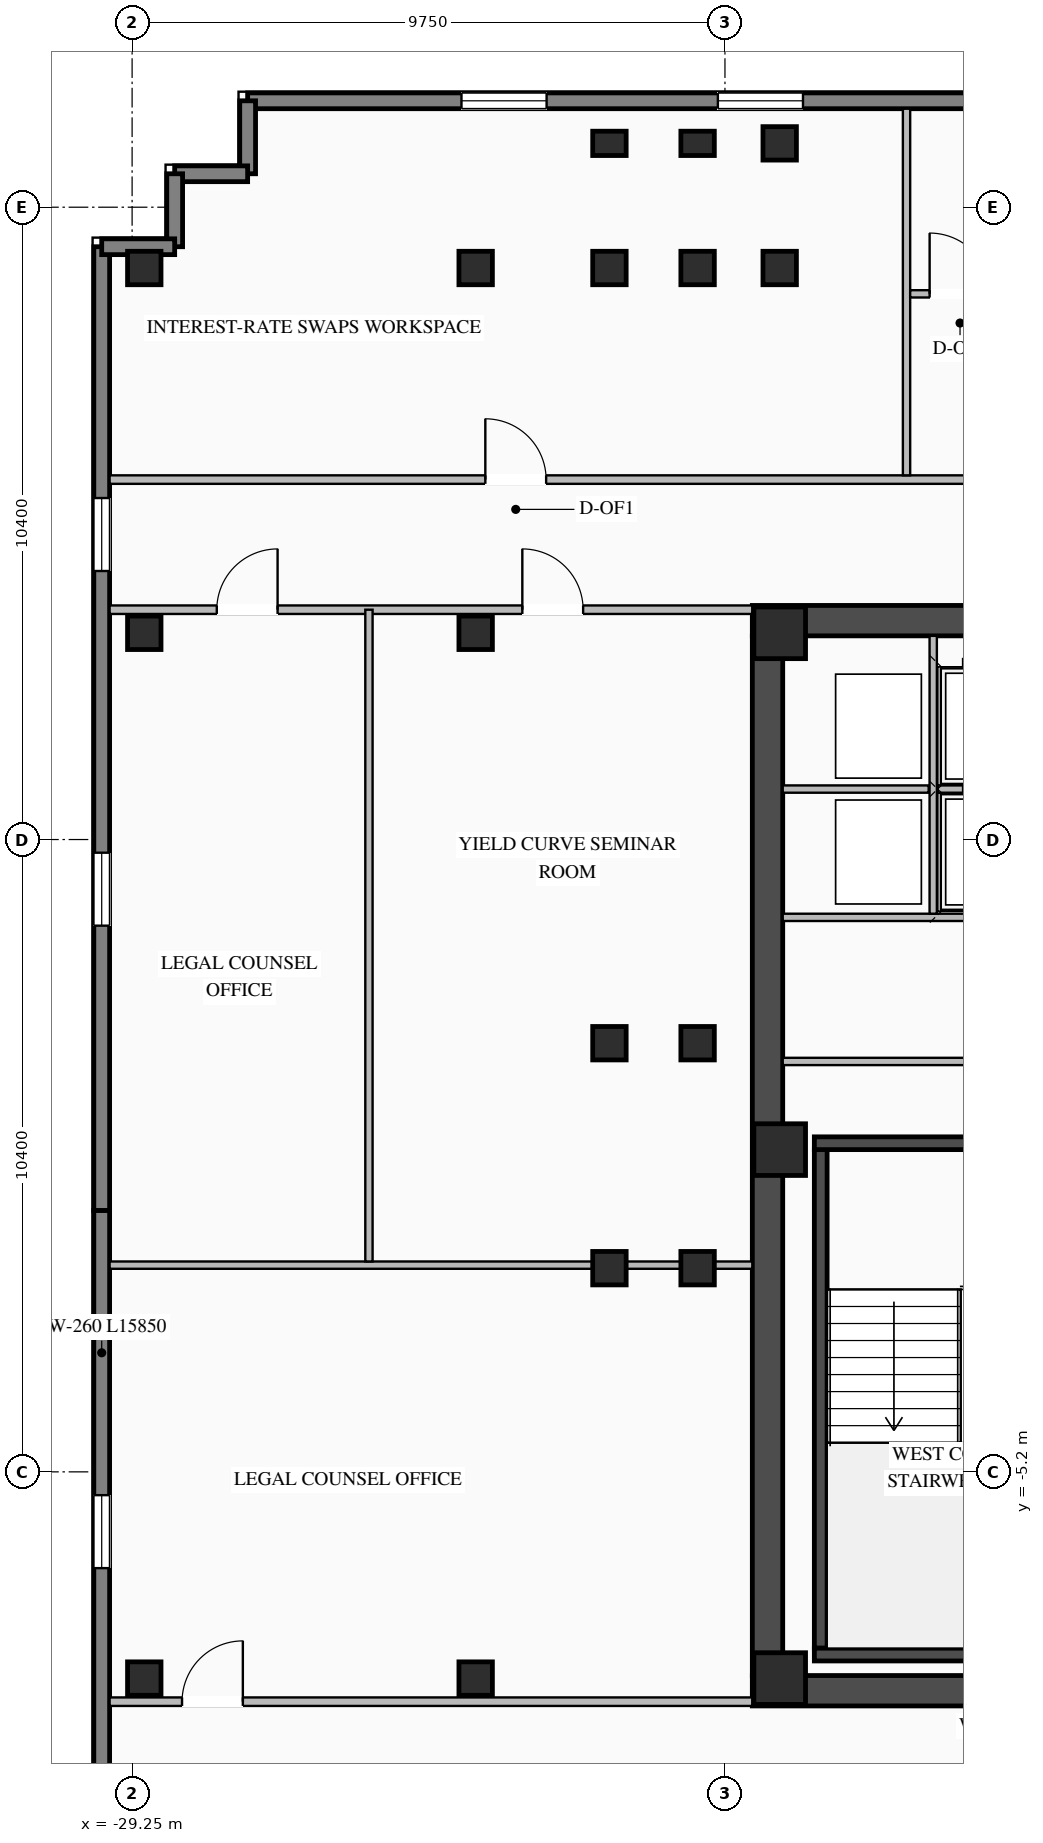
"""IFC4 building model, lengths in metres.
Left out: names, types, materials, properties, quantities, classifications, styles, units other than length and angle.
Written with IfcOpenShell. Run it as: python <this file> out.ifc"""

import sys

from ifc_helpers import new_model, si_unit, direction, frame, frame_2d, origin, origin_2d, place, context, subcontext, project, spatial, rectangle, i_section, extrude, element, fill, save


model = new_model("IFC4")
c1 = context("Model", 3, precision=1e-05, world=origin(), true_north=direction((0.0, 1.0)))
c2 = subcontext(c1, "Body", "Model", "MODEL_VIEW")
j1 = project(units=[si_unit("LENGTHUNIT", "METRE"), si_unit("PLANEANGLEUNIT", "RADIAN")], contexts=[c1])
p1 = place(None, origin())
s1 = spatial("IfcSite", under=j1, at=p1, CompositionType="ELEMENT")
p2 = place(p1, origin())
s2 = spatial("IfcBuilding", under=s1, at=p2, CompositionType="ELEMENT")
p3 = place(p2, frame((0.0, 0.0, 229.2)))
s3 = spatial("IfcBuildingStorey", under=s2, at=p3, CompositionType="ELEMENT", Elevation=229.2)
p4 = place(p3, frame((-19.05, -8.8, 0.0), z_axis=(0.0, 0.0, 1.0), x_axis=(1.0, 0.0, 0.0)))
e1 = element("IfcWall", 1, at=p4, inside=s3, PredefinedType="SHEAR", context=c2, shape_type="SweptSolid", body=[
    extrude(rectangle(XDim=10.25, YDim=0.5, at=frame_2d((5.125, 0.0))), origin(), (0.0, 0.0, 1.0), 3.27),
])
p5 = place(p3, frame((-19.05, 8.8, 0.0), z_axis=(0.0, 0.0, 1.0), x_axis=(1.0, 0.0, 0.0)))
e2 = element("IfcWall", 2, at=p5, inside=s3, PredefinedType="SHEAR", context=c2, shape_type="SweptSolid", body=[
    extrude(rectangle(XDim=10.25, YDim=0.5, at=frame_2d((5.125, 0.0))), origin(), (0.0, 0.0, 1.0), 3.27),
])
p6 = place(p5, frame((5.6, 0.0, 0.0)))
e3 = element("IfcOpeningElement", 3, at=p6, cuts=e2, PredefinedType="OPENING", context=c2, shape_type="SweptSolid", body=[
    extrude(rectangle(XDim=1.4, YDim=2.05, at=frame_2d((0.7, 1.025))), frame((0.0, 0.26, 0.0), z_axis=(0.0, -1.0, 0.0), x_axis=(1.0, 0.0, 0.0)), (0.0, 0.0, 1.0), 0.52),
])
p7 = place(p3, frame((-18.8, -8.55, 0.0), z_axis=(0.0, 0.0, 1.0), x_axis=(0.0, 1.0, 0.0)))
e4 = element("IfcWall", 4, at=p7, inside=s3, PredefinedType="SHEAR", context=c2, shape_type="SweptSolid", body=[
    extrude(rectangle(XDim=17.1, YDim=0.5, at=frame_2d((8.55, 0.0))), origin(), (0.0, 0.0, 1.0), 3.27),
])
p8 = place(p3, frame((-17.925, -8.1, 0.0), z_axis=(0.0, 0.0, 1.0), x_axis=(0.0, 1.0, 0.0)))
e5 = element("IfcWall", 5, at=p8, inside=s3, PredefinedType="SHEAR", context=c2, shape_type="SweptSolid", body=[
    extrude(rectangle(XDim=8.2, YDim=0.21, at=frame_2d((4.1, 0.0))), origin(), (0.0, 0.0, 1.0), 3.27),
])
for number, where, z_axis, x_axis in (
    (6, (-18.03, -8.205, 0.0), (0.0, 0.0, 1.0), (1.0, 0.0, 0.0)),
    (7, (-12.89, 0.205, 0.0), (0.0, 0.0, 1.0), (-1.0, 0.0, 0.0)),
):
    element("IfcWall", number, at=place(p3, frame(where, z_axis=z_axis, x_axis=x_axis)), inside=s3, PredefinedType="SHEAR", context=c2, shape_type="SweptSolid", body=[
        extrude(rectangle(XDim=5.14, YDim=0.21, at=frame_2d((2.57, 0.0))), origin(), (0.0, 0.0, 1.0), 3.27),
    ])
for number, where, z_axis, x_axis in (
    (8, (-18.6, -8.6, 0.0), (0.0, 0.0, 1.0), (1.0, 0.0, 0.0)),
    (9, (-18.6, 0.1, 0.0), (0.0, 0.0, 1.0), (1.0, 0.0, 0.0)),
    (10, (-18.6, 8.6, 0.0), (0.0, 0.0, 1.0), (1.0, 0.0, 0.0)),
):
    element("IfcColumn", number, at=place(p3, frame(where, z_axis=z_axis, x_axis=x_axis)), inside=s3, PredefinedType="COLUMN", context=c2, shape_type="SweptSolid", body=[
        extrude(rectangle(XDim=0.85, YDim=0.85, at=origin_2d()), origin(), (0.0, 0.0, 1.0), 3.45),
    ])
for number, where, z_axis, x_axis in (
    (11, (-21.4, 14.6, 0.0), (0.0, 0.0, 1.0), (1.0, 0.0, 0.0)),
    (12, (-19.95, 14.6, 0.0), (0.0, 0.0, 1.0), (1.0, 0.0, 0.0)),
    (13, (-18.6, 14.6, 0.0), (0.0, 0.0, 1.0), (1.0, 0.0, 0.0)),
    (14, (-21.4, -1.85, 0.0), (0.0, 0.0, 1.0), (1.0, 0.0, 0.0)),
    (15, (-21.4, 1.85, 0.0), (0.0, 0.0, 1.0), (1.0, 0.0, 0.0)),
    (16, (-19.95, -1.85, 0.0), (0.0, 0.0, 1.0), (1.0, 0.0, 0.0)),
    (17, (-19.95, 1.85, 0.0), (0.0, 0.0, 1.0), (1.0, 0.0, 0.0)),
    (18, (-23.6, -8.6, 0.0), (0.0, 0.0, 1.0), (1.0, 0.0, 0.0)),
    (19, (-23.6, 8.6, 0.0), (0.0, 0.0, 1.0), (1.0, 0.0, 0.0)),
    (20, (-23.6, 14.6, 0.0), (0.0, 0.0, 1.0), (1.0, 0.0, 0.0)),
    (21, (-18.6, 16.65, 0.0), (0.0, 0.0, 1.0), (1.0, 0.0, 0.0)),
    (22, (-29.05, -8.6, 0.0), (0.0, 0.0, 1.0), (1.0, 0.0, 0.0)),
    (23, (-29.05, 8.6, 0.0), (0.0, 0.0, 1.0), (1.0, 0.0, 0.0)),
    (24, (-29.05, 14.6, 0.0), (0.0, 0.0, 1.0), (1.0, 0.0, 0.0)),
):
    element("IfcColumn", number, at=place(p3, frame(where, z_axis=z_axis, x_axis=x_axis)), inside=s3, PredefinedType="COLUMN", context=c2, shape_type="SweptSolid", body=[
        extrude(i_section(OverallWidth=0.55, OverallDepth=0.55, WebThickness=0.024, FlangeThickness=0.036, at=origin_2d()), origin(), (0.0, 0.0, 1.0), 3.45),
    ])
for number, where, z_axis, x_axis in (
    (25, (-21.4, 16.65, 0.0), (0.0, 0.0, 1.0), (1.0, 0.0, 0.0)),
    (26, (-19.95, 16.65, 0.0), (0.0, 0.0, 1.0), (1.0, 0.0, 0.0)),
):
    element("IfcColumn", number, at=place(p3, frame(where, z_axis=z_axis, x_axis=x_axis)), inside=s3, PredefinedType="PILASTER", context=c2, shape_type="SweptSolid", body=[
        extrude(rectangle(XDim=0.55, YDim=0.4, at=origin_2d()), origin(), (0.0, 0.0, 1.0), 3.45),
    ])
p9 = place(p3, frame((-27.35, 17.35, 0.0), z_axis=(0.0, 0.0, 1.0), x_axis=(1.0, 0.0, 0.0)))
e27 = element("IfcWall", 27, at=p9, inside=s3, PredefinedType="STANDARD", context=c2, shape_type="SweptSolid", body=[
    extrude(rectangle(XDim=12.65, YDim=0.26, at=frame_2d((6.325, 0.0))), origin(), (0.0, 0.0, 1.0), 3.25),
])
p10 = place(p9, frame((3.517, 0.0, 0.76)))
e28 = element("IfcOpeningElement", 28, at=p10, cuts=e27, PredefinedType="OPENING", context=c2, shape_type="SweptSolid", body=[
    extrude(rectangle(XDim=1.4, YDim=1.95, at=frame_2d((0.7, 0.975))), frame((0.0, 0.14, 0.0), z_axis=(0.0, -1.0, 0.0), x_axis=(1.0, 0.0, 0.0)), (0.0, 0.0, 1.0), 0.28),
])
p11 = place(p9, frame((7.733, 0.0, 0.76)))
e29 = element("IfcOpeningElement", 29, at=p11, cuts=e27, PredefinedType="OPENING", context=c2, shape_type="SweptSolid", body=[
    extrude(rectangle(XDim=1.4, YDim=1.95, at=frame_2d((0.7, 0.975))), frame((0.0, 0.14, 0.0), z_axis=(0.0, -1.0, 0.0), x_axis=(1.0, 0.0, 0.0)), (0.0, 0.0, 1.0), 0.28),
])
p12 = place(p3, frame((-29.75, -16.75, 0.0), z_axis=(0.0, 0.0, 1.0), x_axis=(0.0, 1.0, 0.0)))
e30 = element("IfcWall", 30, at=p12, inside=s3, PredefinedType="STANDARD", context=c2, shape_type="SweptSolid", body=[
    extrude(rectangle(XDim=15.85, YDim=0.26, at=frame_2d((7.925, 0.0))), origin(), (0.0, 0.0, 1.0), 3.25),
])
p13 = place(p12, frame((4.133, 0.0, 0.76)))
e31 = element("IfcOpeningElement", 31, at=p13, cuts=e30, PredefinedType="OPENING", context=c2, shape_type="SweptSolid", body=[
    extrude(rectangle(XDim=1.2, YDim=1.95, at=frame_2d((0.6, 0.975))), frame((0.0, 0.14, 0.0), z_axis=(0.0, -1.0, 0.0), x_axis=(1.0, 0.0, 0.0)), (0.0, 0.0, 1.0), 0.28),
])
p14 = place(p12, frame((9.967, 0.0, 0.76)))
e32 = element("IfcOpeningElement", 32, at=p14, cuts=e30, PredefinedType="OPENING", context=c2, shape_type="SweptSolid", body=[
    extrude(rectangle(XDim=1.2, YDim=1.95, at=frame_2d((0.6, 0.975))), frame((0.0, 0.14, 0.0), z_axis=(0.0, -1.0, 0.0), x_axis=(1.0, 0.0, 0.0)), (0.0, 0.0, 1.0), 0.28),
])
p15 = place(p3, frame((-29.75, -0.9, 0.0), z_axis=(0.0, 0.0, 1.0), x_axis=(0.0, 1.0, 0.0)))
e33 = element("IfcWall", 33, at=p15, inside=s3, PredefinedType="STANDARD", context=c2, shape_type="SweptSolid", body=[
    extrude(rectangle(XDim=15.85, YDim=0.26, at=frame_2d((7.925, 0.0))), origin(), (0.0, 0.0, 1.0), 3.25),
])
p16 = place(p15, frame((4.683, 0.0, 0.76)))
e34 = element("IfcOpeningElement", 34, at=p16, cuts=e33, PredefinedType="OPENING", context=c2, shape_type="SweptSolid", body=[
    extrude(rectangle(XDim=1.2, YDim=1.95, at=frame_2d((0.6, 0.975))), frame((0.0, 0.14, 0.0), z_axis=(0.0, -1.0, 0.0), x_axis=(1.0, 0.0, 0.0)), (0.0, 0.0, 1.0), 0.28),
])
p17 = place(p15, frame((10.517, 0.0, 0.76)))
e35 = element("IfcOpeningElement", 35, at=p17, cuts=e33, PredefinedType="OPENING", context=c2, shape_type="SweptSolid", body=[
    extrude(rectangle(XDim=1.2, YDim=1.95, at=frame_2d((0.6, 0.975))), frame((0.0, 0.14, 0.0), z_axis=(0.0, -1.0, 0.0), x_axis=(1.0, 0.0, 0.0)), (0.0, 0.0, 1.0), 0.28),
])
p18 = place(p3, frame((-27.35, 17.35, 0.0), z_axis=(0.0, 0.0, 1.0), x_axis=(0.0, -1.0, 0.0)))
e36 = element("IfcWall", 36, at=p18, inside=s3, PredefinedType="STANDARD", context=c2, shape_type="SweptSolid", body=[
    extrude(rectangle(XDim=1.2, YDim=0.26, at=frame_2d((0.6, 0.0))), origin(), (0.0, 0.0, 1.0), 2.565),
])
for number, where, z_axis, x_axis in (
    (37, (-27.35, 16.15, 0.0), (0.0, 0.0, 1.0), (-1.0, 0.0, 0.0)),
    (38, (-28.55, 16.15, 0.0), (0.0, 0.0, 1.0), (0.0, -1.0, 0.0)),
    (39, (-28.55, 14.95, 0.0), (0.0, 0.0, 1.0), (-1.0, 0.0, 0.0)),
):
    element("IfcWall", number, at=place(p3, frame(where, z_axis=z_axis, x_axis=x_axis)), inside=s3, PredefinedType="STANDARD", context=c2, shape_type="SweptSolid", body=[
        extrude(rectangle(XDim=1.2, YDim=0.26, at=frame_2d((0.6, 0.0))), origin(), (0.0, 0.0, 1.0), 2.565),
    ])
p19 = place(p3, frame((-18.55, 3.92, 0.0), z_axis=(0.0, 0.0, 1.0), x_axis=(1.0, 0.0, 0.0)))
e40 = element("IfcWall", 40, at=p19, inside=s3, PredefinedType="STANDARD", context=c2, shape_type="SweptSolid", body=[
    extrude(rectangle(XDim=4.65, YDim=0.12, at=frame_2d((2.325, 0.0))), origin(), (0.0, 0.0, 1.0), 3.25),
])
p20 = place(p3, frame((-18.55, 6.03, 0.0), z_axis=(0.0, 0.0, 1.0), x_axis=(1.0, 0.0, 0.0)))
e41 = element("IfcWall", 41, at=p20, inside=s3, PredefinedType="STANDARD", context=c2, shape_type="SweptSolid", body=[
    extrude(rectangle(XDim=2.4, YDim=0.12, at=frame_2d((1.2, 0.0))), origin(), (0.0, 0.0, 1.0), 3.25),
])
p21 = place(p3, frame((-16.075, 3.98, 0.0), z_axis=(0.0, 0.0, 1.0), x_axis=(0.0, 1.0, 0.0)))
e42 = element("IfcWall", 42, at=p21, inside=s3, PredefinedType="STANDARD", context=c2, shape_type="SweptSolid", body=[
    extrude(rectangle(XDim=4.57, YDim=0.12, at=frame_2d((2.285, 0.0))), origin(), (0.0, 0.0, 1.0), 3.25),
])
p22 = place(p3, frame((-16.0, 6.03, 0.0), z_axis=(0.0, 0.0, 1.0), x_axis=(1.0, 0.0, 0.0)))
e43 = element("IfcWall", 43, at=p22, inside=s3, PredefinedType="STANDARD", context=c2, shape_type="SweptSolid", body=[
    extrude(rectangle(XDim=2.1, YDim=0.12, at=frame_2d((1.05, 0.0))), origin(), (0.0, 0.0, 1.0), 3.25),
])
p23 = place(p3, frame((-18.55, 1.55, 0.0), z_axis=(0.0, 0.0, 1.0), x_axis=(1.0, 0.0, 0.0)))
e44 = element("IfcWall", 44, at=p23, inside=s3, PredefinedType="STANDARD", context=c2, shape_type="SweptSolid", body=[
    extrude(rectangle(XDim=4.65, YDim=0.12, at=frame_2d((2.325, 0.0))), origin(), (0.0, 0.0, 1.0), 3.25),
])
p24 = place(p3, frame((-29.62, 11.12, 0.0), z_axis=(0.0, 0.0, 1.0), x_axis=(1.0, 0.0, 0.0)))
e45 = element("IfcWall", 45, at=p24, inside=s3, PredefinedType="STANDARD", context=c2, shape_type="SweptSolid", body=[
    extrude(rectangle(XDim=56.84, YDim=0.14, at=frame_2d((28.42, 0.0))), origin(), (0.0, 0.0, 1.0), 3.25),
])
p25 = place(p24, frame((6.179, 0.0, 0.0)))
e46 = element("IfcOpeningElement", 46, at=p25, cuts=e45, PredefinedType="OPENING", context=c2, shape_type="SweptSolid", body=[
    extrude(rectangle(XDim=1.0, YDim=2.08, at=frame_2d((0.5, 1.04))), frame((0.0, 0.08, 0.0), z_axis=(0.0, -1.0, 0.0), x_axis=(1.0, 0.0, 0.0)), (0.0, 0.0, 1.0), 0.16),
])
p26 = place(p24, frame((20.263, 0.0, 0.0)))
e47 = element("IfcOpeningElement", 47, at=p26, cuts=e45, PredefinedType="OPENING", context=c2, shape_type="SweptSolid", body=[
    extrude(rectangle(XDim=1.0, YDim=2.08, at=frame_2d((0.5, 1.04))), frame((0.0, 0.08, 0.0), z_axis=(0.0, -1.0, 0.0), x_axis=(1.0, 0.0, 0.0)), (0.0, 0.0, 1.0), 0.16),
])
p27 = place(p24, frame((35.577, 0.0, 0.0)))
e48 = element("IfcOpeningElement", 48, at=p27, cuts=e45, PredefinedType="OPENING", context=c2, shape_type="SweptSolid", body=[
    extrude(rectangle(XDim=1.0, YDim=2.08, at=frame_2d((0.5, 1.04))), frame((0.0, 0.08, 0.0), z_axis=(0.0, -1.0, 0.0), x_axis=(1.0, 0.0, 0.0)), (0.0, 0.0, 1.0), 0.16),
])
p28 = place(p24, frame((49.661, 0.0, 0.0)))
e49 = element("IfcOpeningElement", 49, at=p28, cuts=e45, PredefinedType="OPENING", context=c2, shape_type="SweptSolid", body=[
    extrude(rectangle(XDim=1.0, YDim=2.08, at=frame_2d((0.5, 1.04))), frame((0.0, 0.08, 0.0), z_axis=(0.0, -1.0, 0.0), x_axis=(1.0, 0.0, 0.0)), (0.0, 0.0, 1.0), 0.16),
])
p29 = place(p3, frame((-16.514, 11.19, 0.0), z_axis=(0.0, 0.0, 1.0), x_axis=(0.0, 1.0, 0.0)))
e50 = element("IfcWall", 50, at=p29, inside=s3, PredefinedType="STANDARD", context=c2, shape_type="SweptSolid", body=[
    extrude(rectangle(XDim=6.03, YDim=0.12, at=frame_2d((3.015, 0.0))), origin(), (0.0, 0.0, 1.0), 3.25),
])
p30 = place(p3, frame((-16.454, 14.175, 0.0), z_axis=(0.0, 0.0, 1.0), x_axis=(1.0, 0.0, 0.0)))
e51 = element("IfcWall", 51, at=p30, inside=s3, PredefinedType="STANDARD", context=c2, shape_type="SweptSolid", body=[
    extrude(rectangle(XDim=30.508, YDim=0.12, at=frame_2d((15.254, 0.0))), origin(), (0.0, 0.0, 1.0), 3.25),
])
p31 = place(p30, frame((0.32, 0.0, 0.0)))
e52 = element("IfcOpeningElement", 52, at=p31, cuts=e51, PredefinedType="OPENING", context=c2, shape_type="SweptSolid", body=[
    extrude(rectangle(XDim=1.0, YDim=2.08, at=frame_2d((0.5, 1.04))), frame((0.0, 0.07, 0.0), z_axis=(0.0, -1.0, 0.0), x_axis=(1.0, 0.0, 0.0)), (0.0, 0.0, 1.0), 0.14),
])
p32 = place(p30, frame((22.254, 0.0, 0.0)))
e53 = element("IfcOpeningElement", 53, at=p32, cuts=e51, PredefinedType="OPENING", context=c2, shape_type="SweptSolid", body=[
    extrude(rectangle(XDim=1.0, YDim=2.08, at=frame_2d((0.5, 1.04))), frame((0.0, 0.07, 0.0), z_axis=(0.0, -1.0, 0.0), x_axis=(1.0, 0.0, 0.0)), (0.0, 0.0, 1.0), 0.14),
])
p33 = place(p3, frame((-29.62, 8.98, 0.0), z_axis=(0.0, 0.0, 1.0), x_axis=(1.0, 0.0, 0.0)))
e54 = element("IfcWall", 54, at=p33, inside=s3, PredefinedType="STANDARD", context=c2, shape_type="SweptSolid", body=[
    extrude(rectangle(XDim=10.57, YDim=0.14, at=frame_2d((5.285, 0.0))), origin(), (0.0, 0.0, 1.0), 3.25),
])
p34 = place(p33, frame((1.762, 0.0, 0.0)))
e55 = element("IfcOpeningElement", 55, at=p34, cuts=e54, PredefinedType="OPENING", context=c2, shape_type="SweptSolid", body=[
    extrude(rectangle(XDim=1.0, YDim=2.08, at=frame_2d((0.5, 1.04))), frame((0.0, 0.08, 0.0), z_axis=(0.0, -1.0, 0.0), x_axis=(1.0, 0.0, 0.0)), (0.0, 0.0, 1.0), 0.16),
])
p35 = place(p33, frame((6.788, 0.0, 0.0)))
e56 = element("IfcOpeningElement", 56, at=p35, cuts=e54, PredefinedType="OPENING", context=c2, shape_type="SweptSolid", body=[
    extrude(rectangle(XDim=1.0, YDim=2.08, at=frame_2d((0.5, 1.04))), frame((0.0, 0.08, 0.0), z_axis=(0.0, -1.0, 0.0), x_axis=(1.0, 0.0, 0.0)), (0.0, 0.0, 1.0), 0.16),
])
p36 = place(p3, frame((-29.62, -8.98, 0.0), z_axis=(0.0, 0.0, 1.0), x_axis=(1.0, 0.0, 0.0)))
e57 = element("IfcWall", 57, at=p36, inside=s3, PredefinedType="STANDARD", context=c2, shape_type="SweptSolid", body=[
    extrude(rectangle(XDim=10.57, YDim=0.14, at=frame_2d((5.285, 0.0))), origin(), (0.0, 0.0, 1.0), 3.25),
])
p37 = place(p36, frame((1.191, 0.0, 0.0)))
e58 = element("IfcOpeningElement", 58, at=p37, cuts=e57, PredefinedType="OPENING", context=c2, shape_type="SweptSolid", body=[
    extrude(rectangle(XDim=1.0, YDim=2.08, at=frame_2d((0.5, 1.04))), frame((0.0, 0.08, 0.0), z_axis=(0.0, -1.0, 0.0), x_axis=(1.0, 0.0, 0.0)), (0.0, 0.0, 1.0), 0.16),
])
p38 = place(p3, frame((-29.62, -1.8, 0.0), z_axis=(0.0, 0.0, 1.0), x_axis=(1.0, 0.0, 0.0)))
e59 = element("IfcWall", 59, at=p38, inside=s3, PredefinedType="STANDARD", context=c2, shape_type="SweptSolid", body=[
    extrude(rectangle(XDim=10.57, YDim=0.12, at=frame_2d((5.285, 0.0))), origin(), (0.0, 0.0, 1.0), 3.25),
])
p39 = place(p3, frame((-25.355, -1.74, 0.0), z_axis=(0.0, 0.0, 1.0), x_axis=(0.0, 1.0, 0.0)))
e60 = element("IfcWall", 60, at=p39, inside=s3, PredefinedType="STANDARD", context=c2, shape_type="SweptSolid", body=[
    extrude(rectangle(XDim=10.72, YDim=0.12, at=frame_2d((5.36, 0.0))), origin(), (0.0, 0.0, 1.0), 3.25),
])
p40 = place(p10, origin())
e61 = element("IfcWindow", 61, at=p40, inside=s3, PartitioningType="SINGLE_PANEL", PredefinedType="WINDOW", context=c2, shape_type="SweptSolid", body=[
    extrude(rectangle(XDim=1.4, YDim=1.95, at=frame_2d((0.7, 0.975))), frame((0.0, 0.03, 0.0), z_axis=(0.0, -1.0, 0.0), x_axis=(1.0, 0.0, 0.0)), (0.0, 0.0, 1.0), 0.06),
])
fill(e28, e61)
p41 = place(p11, origin())
e62 = element("IfcWindow", 62, at=p41, inside=s3, PartitioningType="SINGLE_PANEL", PredefinedType="WINDOW", context=c2, shape_type="SweptSolid", body=[
    extrude(rectangle(XDim=1.4, YDim=1.95, at=frame_2d((0.7, 0.975))), frame((0.0, 0.03, 0.0), z_axis=(0.0, -1.0, 0.0), x_axis=(1.0, 0.0, 0.0)), (0.0, 0.0, 1.0), 0.06),
])
fill(e29, e62)
p42 = place(p14, origin())
e63 = element("IfcWindow", 63, at=p42, inside=s3, PartitioningType="SINGLE_PANEL", PredefinedType="WINDOW", context=c2, shape_type="SweptSolid", body=[
    extrude(rectangle(XDim=1.2, YDim=1.95, at=frame_2d((0.6, 0.975))), frame((0.0, 0.03, 0.0), z_axis=(0.0, -1.0, 0.0), x_axis=(1.0, 0.0, 0.0)), (0.0, 0.0, 1.0), 0.06),
])
fill(e32, e63)
p43 = place(p16, origin())
e64 = element("IfcWindow", 64, at=p43, inside=s3, PartitioningType="SINGLE_PANEL", PredefinedType="WINDOW", context=c2, shape_type="SweptSolid", body=[
    extrude(rectangle(XDim=1.2, YDim=1.95, at=frame_2d((0.6, 0.975))), frame((0.0, 0.03, 0.0), z_axis=(0.0, -1.0, 0.0), x_axis=(1.0, 0.0, 0.0)), (0.0, 0.0, 1.0), 0.06),
])
fill(e34, e64)
p44 = place(p17, origin())
e65 = element("IfcWindow", 65, at=p44, inside=s3, PartitioningType="SINGLE_PANEL", PredefinedType="WINDOW", context=c2, shape_type="SweptSolid", body=[
    extrude(rectangle(XDim=1.2, YDim=1.95, at=frame_2d((0.6, 0.975))), frame((0.0, 0.03, 0.0), z_axis=(0.0, -1.0, 0.0), x_axis=(1.0, 0.0, 0.0)), (0.0, 0.0, 1.0), 0.06),
])
fill(e35, e65)
p45 = place(p25, origin())
e66 = element("IfcDoor", 66, at=p45, inside=s3, OperationType="SINGLE_SWING_LEFT", PredefinedType="DOOR", context=c2, shape_type="SweptSolid", body=[
    extrude(rectangle(XDim=1.0, YDim=2.08, at=frame_2d((0.5, 1.04))), frame((0.0, 0.025, 0.0), z_axis=(0.0, -1.0, 0.0), x_axis=(1.0, 0.0, 0.0)), (0.0, 0.0, 1.0), 0.05),
])
fill(e46, e66)
p46 = place(p31, origin())
e67 = element("IfcDoor", 67, at=p46, inside=s3, OperationType="SINGLE_SWING_LEFT", PredefinedType="DOOR", context=c2, shape_type="SweptSolid", body=[
    extrude(rectangle(XDim=1.0, YDim=2.08, at=frame_2d((0.5, 1.04))), frame((0.0, 0.025, 0.0), z_axis=(0.0, -1.0, 0.0), x_axis=(1.0, 0.0, 0.0)), (0.0, 0.0, 1.0), 0.05),
])
fill(e52, e67)
p47 = place(p34, origin())
e68 = element("IfcDoor", 68, at=p47, inside=s3, OperationType="SINGLE_SWING_RIGHT", PredefinedType="DOOR", context=c2, shape_type="SweptSolid", body=[
    extrude(rectangle(XDim=1.0, YDim=2.08, at=frame_2d((0.5, 1.04))), frame((0.0, 0.025, 0.0), z_axis=(0.0, -1.0, 0.0), x_axis=(1.0, 0.0, 0.0)), (0.0, 0.0, 1.0), 0.05),
])
fill(e55, e68)
p48 = place(p35, origin())
e69 = element("IfcDoor", 69, at=p48, inside=s3, OperationType="SINGLE_SWING_LEFT", PredefinedType="DOOR", context=c2, shape_type="SweptSolid", body=[
    extrude(rectangle(XDim=1.0, YDim=2.08, at=frame_2d((0.5, 1.04))), frame((0.0, 0.025, 0.0), z_axis=(0.0, -1.0, 0.0), x_axis=(1.0, 0.0, 0.0)), (0.0, 0.0, 1.0), 0.05),
])
fill(e56, e69)
p49 = place(p37, origin())
e70 = element("IfcDoor", 70, at=p49, inside=s3, OperationType="SINGLE_SWING_RIGHT", PredefinedType="DOOR", context=c2, shape_type="SweptSolid", body=[
    extrude(rectangle(XDim=1.0, YDim=2.08, at=frame_2d((0.5, 1.04))), frame((0.0, 0.025, 0.0), z_axis=(0.0, -1.0, 0.0), x_axis=(1.0, 0.0, 0.0)), (0.0, 0.0, 1.0), 0.05),
])
fill(e58, e70)
save(model, sys.argv[1])
